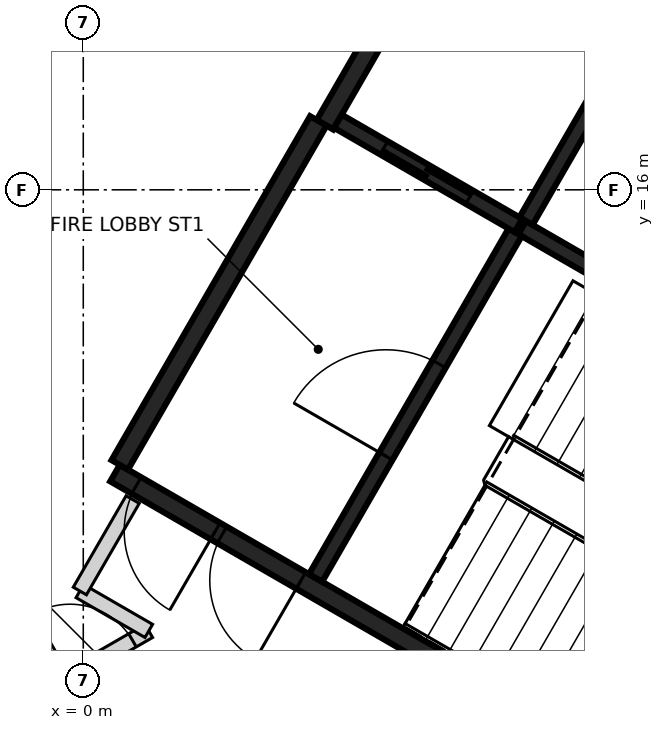
"""IFC4 building model, lengths in metres.
Left out: names, types, materials, properties, quantities, classifications, styles, units other than length and angle.
Written with IfcOpenShell. Run it as: python <this file> out.ifc"""

import sys

from ifc_helpers import new_model, si_unit, direction, frame, frame_2d, origin, place, context, subcontext, project, spatial, rectangle, extrude, element, fill, save


model = new_model("IFC4")
c1 = context("Model", 3, precision=1e-05, world=origin(), true_north=direction((0.0, 1.0)))
c2 = subcontext(c1, "Body", "Model", "MODEL_VIEW")
j1 = project(units=[si_unit("LENGTHUNIT", "METRE"), si_unit("PLANEANGLEUNIT", "RADIAN")], contexts=[c1])
p1 = place(None, origin())
s1 = spatial("IfcSite", under=j1, at=p1, CompositionType="ELEMENT")
p2 = place(p1, origin())
s2 = spatial("IfcBuilding", under=s1, at=p2, CompositionType="ELEMENT")
p3 = place(p2, frame((0.0, 0.0, 150.4)))
s3 = spatial("IfcBuildingStorey", under=s2, at=p3, CompositionType="ELEMENT", Elevation=150.4)
p4 = place(p3, frame((10.42, 6.498, 0.0), z_axis=(0.0, 0.0, 1.0), x_axis=(-0.866021906294, 0.500006057782, 0.0)))
e1 = element("IfcWall", 1, at=p4, inside=s3, PredefinedType="SHEAR", context=c2, shape_type="SweptSolid", body=[
    extrude(rectangle(XDim=11.55, YDim=0.25, at=frame_2d((5.775, 0.0))), origin(), (0.0, 0.0, 1.0), 3.2),
])
p5 = place(p4, frame((10.025, 0.0, 0.0)))
e2 = element("IfcOpeningElement", 2, at=p5, cuts=e1, PredefinedType="OPENING", context=c2, shape_type="SweptSolid", body=[
    extrude(rectangle(XDim=1.2, YDim=2.1, at=frame_2d((0.6, 1.05))), frame((0.0, 0.135, 0.0), z_axis=(0.0, -1.0, 0.0), x_axis=(1.0, 0.0, 0.0)), (0.0, 0.0, 1.0), 0.27),
])
p6 = place(p4, frame((8.725, 0.0, 0.0)))
e3 = element("IfcOpeningElement", 3, at=p6, cuts=e1, PredefinedType="OPENING", context=c2, shape_type="SweptSolid", body=[
    extrude(rectangle(XDim=1.2, YDim=2.1, at=frame_2d((0.6, 1.05))), frame((0.0, 0.135, 0.0), z_axis=(0.0, -1.0, 0.0), x_axis=(1.0, 0.0, 0.0)), (0.0, 0.0, 1.0), 0.27),
])
p7 = place(p3, frame((3.179, 16.856, 0.0), z_axis=(0.0, 0.0, 1.0), x_axis=(0.500004234368, 0.866022959057, 0.0)))
e4 = element("IfcWall", 4, at=p7, inside=s3, PredefinedType="SHEAR", context=c2, shape_type="SweptSolid", body=[
    extrude(rectangle(XDim=6.25, YDim=0.25, at=frame_2d((3.125, 0.0))), origin(), (0.0, 0.0, 1.0), 3.2),
])
p8 = place(p3, frame((0.48, 12.381, 0.0), z_axis=(0.0, 0.0, 1.0), x_axis=(0.49999885962, 0.866026062182, 0.0)))
e5 = element("IfcWall", 5, at=p8, inside=s3, PredefinedType="SHEAR", context=c2, shape_type="SweptSolid", body=[
    extrude(rectangle(XDim=5.225, YDim=0.25, at=frame_2d((2.612, 0.0))), origin(), (0.0, 0.0, 1.0), 3.2),
])
p9 = place(p3, frame((5.775, 15.502, 0.0), z_axis=(0.0, 0.0, 1.0), x_axis=(0.866020080793, -0.500009219579, 0.0)))
e6 = element("IfcWall", 6, at=p9, inside=s3, PredefinedType="SHEAR", context=c2, shape_type="SweptSolid", body=[
    extrude(rectangle(XDim=5.699, YDim=0.2, at=frame_2d((2.85, 0.0))), origin(), (0.0, 0.0, 1.0), 3.2),
])
p10 = place(p3, frame((3.057, 10.895, 0.0), z_axis=(0.0, 0.0, 1.0), x_axis=(0.499989418164, 0.866031513124, 0.0)))
e7 = element("IfcWall", 7, at=p10, inside=s3, PredefinedType="SHEAR", context=c2, shape_type="SweptSolid", body=[
    extrude(rectangle(XDim=5.251, YDim=0.2, at=frame_2d((2.625, 0.0))), origin(), (0.0, 0.0, 1.0), 3.2),
])
p11 = place(p10, frame((1.849, 0.0, 0.0)))
e8 = element("IfcOpeningElement", 8, at=p11, cuts=e7, PredefinedType="OPENING", context=c2, shape_type="SweptSolid", body=[
    extrude(rectangle(XDim=1.4, YDim=2.1, at=frame_2d((0.7, 1.05))), frame((0.0, 0.11, 0.0), z_axis=(0.0, -1.0, 0.0), x_axis=(1.0, 0.0, 0.0)), (0.0, 0.0, 1.0), 0.22),
])
p12 = place(p3, frame((7.199, 17.97, 0.0), z_axis=(0.0, 0.0, 1.0), x_axis=(-0.499968400327, -0.866043647095, 0.0)))
e9 = element("IfcWall", 9, at=p12, inside=s3, PredefinedType="SHEAR", context=c2, shape_type="SweptSolid", body=[
    extrude(rectangle(XDim=2.75, YDim=0.2, at=frame_2d((1.375, 0.0))), origin(), (0.0, 0.0, 1.0), 3.2),
])
p13 = place(p3, frame((5.725, 15.531, 0.0), z_axis=(0.0, 0.0, 1.0), x_axis=(-0.866037306777, 0.499979382845, 0.0)))
e10 = element("IfcWall", 10, at=p13, inside=s3, PredefinedType="SHEAR", context=c2, shape_type="SweptSolid", body=[
    extrude(rectangle(XDim=2.742, YDim=0.2, at=frame_2d((1.371, 0.0))), origin(), (0.0, 0.0, 1.0), 3.2),
])
p14 = place(p13, frame((0.743, 0.0, 0.0)))
e11 = element("IfcOpeningElement", 11, at=p14, cuts=e10, PredefinedType="OPENING", context=c2, shape_type="SweptSolid", body=[
    extrude(rectangle(XDim=1.3, YDim=2.1, at=frame_2d((0.65, 1.05))), frame((0.0, 0.11, 0.0), z_axis=(0.0, -1.0, 0.0), x_axis=(1.0, 0.0, 0.0)), (0.0, 0.0, 1.0), 0.22),
])
p15 = place(p3, frame((-6.976, 5.674, 0.0), z_axis=(0.0, 0.0, 1.0), x_axis=(0.8661469583, 0.499789402276, 0.0)))
e12 = element("IfcWall", 12, at=p15, inside=s3, PredefinedType="PARTITIONING", context=c2, shape_type="SweptSolid", body=[
    extrude(rectangle(XDim=9.05, YDim=0.2, at=frame_2d((4.525, 0.0))), origin(), (0.0, 0.0, 1.0), 3.2),
])
p16 = place(p15, frame((7.852, 0.0, 0.0)))
e13 = element("IfcOpeningElement", 13, at=p16, cuts=e12, PredefinedType="OPENING", context=c2, shape_type="SweptSolid", body=[
    extrude(rectangle(XDim=0.95, YDim=2.1, at=frame_2d((0.475, 1.05))), frame((0.0, 0.11, 0.0), z_axis=(0.0, -1.0, 0.0), x_axis=(1.0, 0.0, 0.0)), (0.0, 0.0, 1.0), 0.22),
])
p17 = place(p15, frame((2.923, 0.0, 0.0)))
e14 = element("IfcOpeningElement", 14, at=p17, cuts=e12, PredefinedType="OPENING", context=c2, shape_type="SweptSolid", body=[
    extrude(rectangle(XDim=0.95, YDim=2.1, at=frame_2d((0.475, 1.05))), frame((0.0, 0.11, 0.0), z_axis=(0.0, -1.0, 0.0), x_axis=(1.0, 0.0, 0.0)), (0.0, 0.0, 1.0), 0.22),
])
p18 = place(p3, frame((-0.045, 10.721, 0.0), z_axis=(0.0, 0.0, 1.0), x_axis=(0.865909943543, -0.500199929702, 0.0)))
e15 = element("IfcWall", 15, at=p18, inside=s3, PredefinedType="PARTITIONING", context=c2, shape_type="SweptSolid", body=[
    extrude(rectangle(XDim=1.047, YDim=0.2, at=frame_2d((0.524, 0.0))), origin(), (0.0, 0.0, 1.0), 3.2),
])
p19 = place(p3, frame((-0.045, 10.722, 0.0), z_axis=(0.0, 0.0, 1.0), x_axis=(0.500107785535, 0.865963164833, 0.0)))
e16 = element("IfcWall", 16, at=p19, inside=s3, PredefinedType="PARTITIONING", context=c2, shape_type="SweptSolid", body=[
    extrude(rectangle(XDim=1.389, YDim=0.2, at=frame_2d((0.695, 0.0))), origin(), (0.0, 0.0, 1.0), 3.2),
])
p20 = place(p14, origin())
e17 = element("IfcDoor", 17, at=p20, inside=s3, OperationType="SLIDING_TO_LEFT", PredefinedType="DOOR", context=c2, shape_type="SweptSolid", body=[
    extrude(rectangle(XDim=1.3, YDim=2.1, at=frame_2d((0.65, 1.05))), frame((0.0, 0.025, 0.0), z_axis=(0.0, -1.0, 0.0), x_axis=(1.0, 0.0, 0.0)), (0.0, 0.0, 1.0), 0.05),
])
fill(e11, e17)
p21 = place(p5, origin())
e18 = element("IfcDoor", 18, at=p21, inside=s3, OperationType="SINGLE_SWING_LEFT", PredefinedType="DOOR", context=c2, shape_type="SweptSolid", body=[
    extrude(rectangle(XDim=1.2, YDim=2.1, at=frame_2d((0.6, 1.05))), frame((0.0, 0.025, 0.0), z_axis=(0.0, -1.0, 0.0), x_axis=(1.0, 0.0, 0.0)), (0.0, 0.0, 1.0), 0.05),
])
fill(e2, e18)
p22 = place(p6, origin())
e19 = element("IfcDoor", 19, at=p22, inside=s3, OperationType="SINGLE_SWING_RIGHT", PredefinedType="DOOR", context=c2, shape_type="SweptSolid", body=[
    extrude(rectangle(XDim=1.2, YDim=2.1, at=frame_2d((0.6, 1.05))), frame((0.0, 0.025, 0.0), z_axis=(0.0, -1.0, 0.0), x_axis=(1.0, 0.0, 0.0)), (0.0, 0.0, 1.0), 0.05),
])
fill(e3, e19)
p23 = place(p11, origin())
e20 = element("IfcDoor", 20, at=p23, inside=s3, OperationType="SINGLE_SWING_LEFT", PredefinedType="DOOR", context=c2, shape_type="SweptSolid", body=[
    extrude(rectangle(XDim=1.4, YDim=2.1, at=frame_2d((0.7, 1.05))), frame((0.0, 0.025, 0.0), z_axis=(0.0, -1.0, 0.0), x_axis=(1.0, 0.0, 0.0)), (0.0, 0.0, 1.0), 0.05),
])
fill(e8, e20)
p24 = place(p16, origin())
e21 = element("IfcDoor", 21, at=p24, inside=s3, OperationType="SINGLE_SWING_LEFT", PredefinedType="DOOR", context=c2, shape_type="SweptSolid", body=[
    extrude(rectangle(XDim=0.95, YDim=2.1, at=frame_2d((0.475, 1.05))), frame((0.0, 0.025, 0.0), z_axis=(0.0, -1.0, 0.0), x_axis=(1.0, 0.0, 0.0)), (0.0, 0.0, 1.0), 0.05),
])
fill(e13, e21)
save(model, sys.argv[1])
